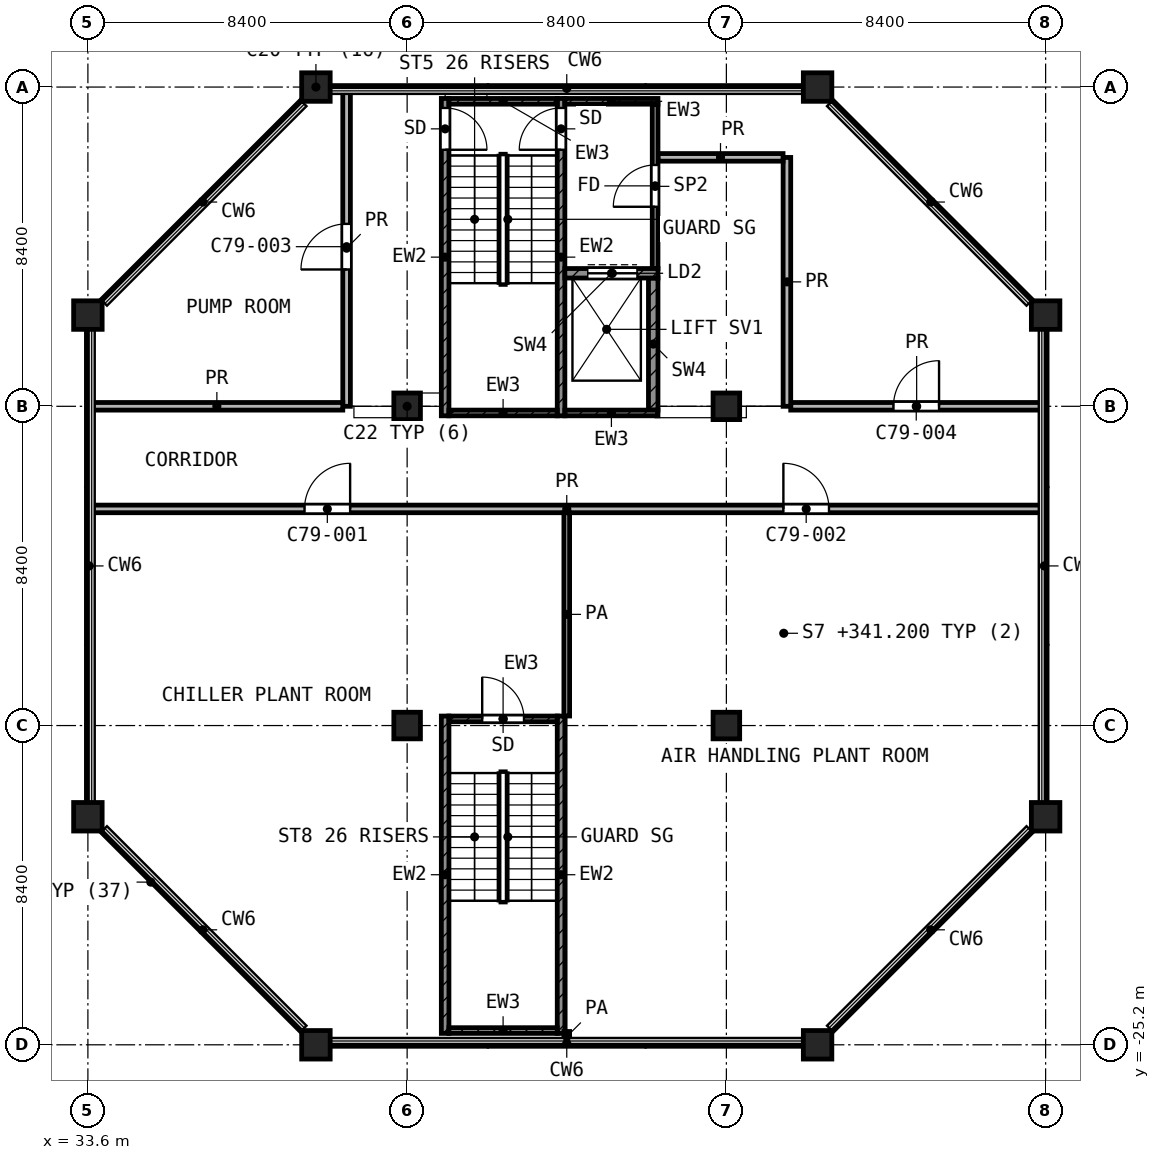
"""IFC4 building model, lengths in metres.
Left out: names, types, materials, properties, quantities, classifications, styles, units other than length and angle.
Written with IfcOpenShell. Run it as: python <this file> out.ifc"""

import sys

from ifc_helpers import new_model, si_unit, direction, frame, frame_2d, origin, origin_2d, place, context, subcontext, project, spatial, rectangle, extrude, element, fill, save


model = new_model("IFC4")
c1 = context("Model", 3, precision=1e-05, world=origin(), true_north=direction((0.0, 1.0)))
c2 = subcontext(c1, "Body", "Model", "MODEL_VIEW")
j1 = project(units=[si_unit("LENGTHUNIT", "METRE"), si_unit("PLANEANGLEUNIT", "RADIAN")], contexts=[c1])
p1 = place(None, origin())
s1 = spatial("IfcSite", under=j1, at=p1, CompositionType="ELEMENT")
p2 = place(p1, origin())
s2 = spatial("IfcBuilding", under=s1, at=p2, CompositionType="ELEMENT")
p3 = place(p2, frame((0.0, 0.0, 341.2)))
s3 = spatial("IfcBuildingStorey", under=s2, at=p3, CompositionType="ELEMENT", Elevation=341.2)
for number, where, z_axis, x_axis in (
    (1, (39.6, 0.0, 0.0), (0.0, 0.0, 1.0), (1.0, 0.0, 0.0)),
    (2, (52.8, 0.0, 0.0), (0.0, 0.0, 1.0), (1.0, 0.0, 0.0)),
    (3, (33.6, -6.0, 0.0), (0.0, 0.0, 1.0), (1.0, 0.0, 0.0)),
    (4, (58.8, -6.0, 0.0), (0.0, 0.0, 1.0), (1.0, 0.0, 0.0)),
):
    element("IfcColumn", number, at=place(p3, frame(where, z_axis=z_axis, x_axis=x_axis)), inside=s3, PredefinedType="COLUMN", context=c2, shape_type="SweptSolid", body=[
        extrude(rectangle(XDim=0.75, YDim=0.75, at=origin_2d()), origin(), (0.0, 0.0, 1.0), 4.5),
    ])
for number, where, z_axis, x_axis in (
    (5, (42.0, -8.4, 0.0), (0.0, 0.0, 1.0), (1.0, 0.0, 0.0)),
    (6, (50.4, -8.4, 0.0), (0.0, 0.0, 1.0), (1.0, 0.0, 0.0)),
    (7, (42.0, -16.8, 0.0), (0.0, 0.0, 1.0), (1.0, 0.0, 0.0)),
    (8, (50.4, -16.8, 0.0), (0.0, 0.0, 1.0), (1.0, 0.0, 0.0)),
):
    element("IfcColumn", number, at=place(p3, frame(where, z_axis=z_axis, x_axis=x_axis)), inside=s3, PredefinedType="COLUMN", context=c2, shape_type="SweptSolid", body=[
        extrude(rectangle(XDim=0.7, YDim=0.7, at=origin_2d()), origin(), (0.0, 0.0, 1.0), 4.5),
    ])
for number, where, z_axis, x_axis in (
    (9, (33.6, -19.2, 0.0), (0.0, 0.0, 1.0), (1.0, 0.0, 0.0)),
    (10, (58.8, -19.2, 0.0), (0.0, 0.0, 1.0), (1.0, 0.0, 0.0)),
    (11, (39.6, -25.2, 0.0), (0.0, 0.0, 1.0), (1.0, 0.0, 0.0)),
    (12, (52.8, -25.2, 0.0), (0.0, 0.0, 1.0), (1.0, 0.0, 0.0)),
):
    element("IfcColumn", number, at=place(p3, frame(where, z_axis=z_axis, x_axis=x_axis)), inside=s3, PredefinedType="COLUMN", context=c2, shape_type="SweptSolid", body=[
        extrude(rectangle(XDim=0.75, YDim=0.75, at=origin_2d()), origin(), (0.0, 0.0, 1.0), 4.5),
    ])
p4 = place(p3, frame((43.0, -8.65, 0.0), z_axis=(0.0, 0.0, 1.0), x_axis=(0.0, 1.0, 0.0)))
e13 = element("IfcWall", 13, at=p4, inside=s3, PredefinedType="SHEAR", context=c2, shape_type="SweptSolid", body=[
    extrude(rectangle(XDim=8.35, YDim=0.2, at=frame_2d((4.175, 0.0))), origin(), (0.0, 0.0, 1.0), 4.2),
])
p5 = place(p4, frame((7.0, 0.0, 0.0)))
e14 = element("IfcOpeningElement", 14, at=p5, cuts=e13, PredefinedType="OPENING", context=c2, shape_type="SweptSolid", body=[
    extrude(rectangle(XDim=1.1, YDim=2.1, at=frame_2d((0.55, 1.05))), frame((0.0, 0.11, 0.0), z_axis=(0.0, -1.0, 0.0), x_axis=(1.0, 0.0, 0.0)), (0.0, 0.0, 1.0), 0.22),
])
p6 = place(p3, frame((46.05, -8.65, 0.0), z_axis=(0.0, 0.0, 1.0), x_axis=(0.0, 1.0, 0.0)))
e15 = element("IfcWall", 15, at=p6, inside=s3, PredefinedType="SHEAR", context=c2, shape_type="SweptSolid", body=[
    extrude(rectangle(XDim=8.35, YDim=0.2, at=frame_2d((4.175, 0.0))), origin(), (0.0, 0.0, 1.0), 4.2),
])
p7 = place(p6, frame((7.0, 0.0, 0.0)))
e16 = element("IfcOpeningElement", 16, at=p7, cuts=e15, PredefinedType="OPENING", context=c2, shape_type="SweptSolid", body=[
    extrude(rectangle(XDim=1.1, YDim=2.1, at=frame_2d((0.55, 1.05))), frame((0.0, 0.11, 0.0), z_axis=(0.0, -1.0, 0.0), x_axis=(1.0, 0.0, 0.0)), (0.0, 0.0, 1.0), 0.22),
])
p8 = place(p3, frame((43.1, -0.375, 0.0), z_axis=(0.0, 0.0, 1.0), x_axis=(1.0, 0.0, 0.0)))
e17 = element("IfcWall", 17, at=p8, inside=s3, PredefinedType="SHEAR", context=c2, shape_type="SweptSolid", body=[
    extrude(rectangle(XDim=2.85, YDim=0.15, at=frame_2d((1.425, 0.0))), origin(), (0.0, 0.0, 1.0), 4.2),
])
p9 = place(p3, frame((46.15, -0.375, 0.0), z_axis=(0.0, 0.0, 1.0), x_axis=(1.0, 0.0, 0.0)))
e18 = element("IfcWall", 18, at=p9, inside=s3, PredefinedType="SHEAR", context=c2, shape_type="SweptSolid", body=[
    extrude(rectangle(XDim=2.45, YDim=0.15, at=frame_2d((1.225, 0.0))), origin(), (0.0, 0.0, 1.0), 4.2),
])
p10 = place(p3, frame((43.1, -8.575, 0.0), z_axis=(0.0, 0.0, 1.0), x_axis=(1.0, 0.0, 0.0)))
e19 = element("IfcWall", 19, at=p10, inside=s3, PredefinedType="SHEAR", context=c2, shape_type="SweptSolid", body=[
    extrude(rectangle(XDim=2.85, YDim=0.15, at=frame_2d((1.425, 0.0))), origin(), (0.0, 0.0, 1.0), 4.2),
])
p11 = place(p3, frame((46.15, -8.575, 0.0), z_axis=(0.0, 0.0, 1.0), x_axis=(1.0, 0.0, 0.0)))
e20 = element("IfcWall", 20, at=p11, inside=s3, PredefinedType="SHEAR", context=c2, shape_type="SweptSolid", body=[
    extrude(rectangle(XDim=2.45, YDim=0.15, at=frame_2d((1.225, 0.0))), origin(), (0.0, 0.0, 1.0), 4.2),
])
p12 = place(p3, frame((46.15, -4.9, 0.0), z_axis=(0.0, 0.0, 1.0), x_axis=(1.0, 0.0, 0.0)))
e21 = element("IfcWall", 21, at=p12, inside=s3, PredefinedType="SHEAR", context=c2, shape_type="SweptSolid", body=[
    extrude(rectangle(XDim=2.45, YDim=0.25, at=frame_2d((1.225, 0.0))), origin(), (0.0, 0.0, 1.0), 4.2),
])
p13 = place(p12, frame((0.6, 0.0, 0.0)))
e22 = element("IfcOpeningElement", 22, at=p13, cuts=e21, PredefinedType="OPENING", context=c2, shape_type="SweptSolid", body=[
    extrude(rectangle(XDim=1.3, YDim=2.1, at=frame_2d((0.65, 1.05))), frame((0.0, 0.135, 0.0), z_axis=(0.0, -1.0, 0.0), x_axis=(1.0, 0.0, 0.0)), (0.0, 0.0, 1.0), 0.27),
])
p14 = place(p3, frame((48.475, -8.5, 0.0), z_axis=(0.0, 0.0, 1.0), x_axis=(0.0, 1.0, 0.0)))
e23 = element("IfcWall", 23, at=p14, inside=s3, PredefinedType="SHEAR", context=c2, shape_type="SweptSolid", body=[
    extrude(rectangle(XDim=3.475, YDim=0.25, at=frame_2d((1.738, 0.0))), origin(), (0.0, 0.0, 1.0), 4.2),
])
p15 = place(p3, frame((48.525, -4.775, 0.0), z_axis=(0.0, 0.0, 1.0), x_axis=(0.0, 1.0, 0.0)))
e24 = element("IfcWall", 24, at=p15, inside=s3, PredefinedType="PARTITIONING", context=c2, shape_type="SweptSolid", body=[
    extrude(rectangle(XDim=4.325, YDim=0.15, at=frame_2d((2.163, 0.0))), origin(), (0.0, 0.0, 1.0), 4.2),
])
p16 = place(p15, frame((1.625, 0.0, 0.0)))
e25 = element("IfcOpeningElement", 25, at=p16, cuts=e24, PredefinedType="OPENING", context=c2, shape_type="SweptSolid", body=[
    extrude(rectangle(XDim=1.1, YDim=2.1, at=frame_2d((0.55, 1.05))), frame((0.0, 0.085, 0.0), z_axis=(0.0, -1.0, 0.0), x_axis=(1.0, 0.0, 0.0)), (0.0, 0.0, 1.0), 0.17),
])
for number, where, z_axis, x_axis in (
    (26, (43.0, -24.9, 0.0), (0.0, 0.0, 1.0), (0.0, 1.0, 0.0)),
    (27, (46.05, -24.9, 0.0), (0.0, 0.0, 1.0), (0.0, 1.0, 0.0)),
):
    element("IfcWall", number, at=place(p3, frame(where, z_axis=z_axis, x_axis=x_axis)), inside=s3, PredefinedType="SHEAR", context=c2, shape_type="SweptSolid", body=[
        extrude(rectangle(XDim=8.35, YDim=0.2, at=frame_2d((4.175, 0.0))), origin(), (0.0, 0.0, 1.0), 4.2),
    ])
p17 = place(p3, frame((43.1, -16.625, 0.0), z_axis=(0.0, 0.0, 1.0), x_axis=(1.0, 0.0, 0.0)))
e28 = element("IfcWall", 28, at=p17, inside=s3, PredefinedType="SHEAR", context=c2, shape_type="SweptSolid", body=[
    extrude(rectangle(XDim=2.85, YDim=0.15, at=frame_2d((1.425, 0.0))), origin(), (0.0, 0.0, 1.0), 4.2),
])
p18 = place(p17, frame((0.875, 0.0, 0.0)))
e29 = element("IfcOpeningElement", 29, at=p18, cuts=e28, PredefinedType="OPENING", context=c2, shape_type="SweptSolid", body=[
    extrude(rectangle(XDim=1.1, YDim=2.1, at=frame_2d((0.55, 1.05))), frame((0.0, 0.085, 0.0), z_axis=(0.0, -1.0, 0.0), x_axis=(1.0, 0.0, 0.0)), (0.0, 0.0, 1.0), 0.17),
])
p19 = place(p3, frame((43.1, -24.825, 0.0), z_axis=(0.0, 0.0, 1.0), x_axis=(1.0, 0.0, 0.0)))
e30 = element("IfcWall", 30, at=p19, inside=s3, PredefinedType="SHEAR", context=c2, shape_type="SweptSolid", body=[
    extrude(rectangle(XDim=2.85, YDim=0.15, at=frame_2d((1.425, 0.0))), origin(), (0.0, 0.0, 1.0), 4.2),
])
p20 = place(p3, frame((46.2, -25.12, 0.0), z_axis=(0.0, 0.0, 1.0), x_axis=(0.0, 1.0, 0.0)))
e31 = element("IfcWall", 31, at=p20, inside=s3, PredefinedType="PARTITIONING", context=c2, shape_type="SweptSolid", body=[
    extrude(rectangle(XDim=0.27, YDim=0.15, at=frame_2d((0.135, 0.0))), origin(), (0.0, 0.0, 1.0), 4.2),
])
p21 = place(p3, frame((46.2, -16.549, 0.0), z_axis=(0.0, 0.0, 1.0), x_axis=(0.0, 1.0, 0.0)))
e32 = element("IfcWall", 32, at=p21, inside=s3, PredefinedType="PARTITIONING", context=c2, shape_type="SweptSolid", body=[
    extrude(rectangle(XDim=5.349, YDim=0.15, at=frame_2d((2.675, 0.0))), origin(), (0.0, 0.0, 1.0), 4.2),
])
p22 = place(p3, frame((33.68, -11.1, 0.0), z_axis=(0.0, 0.0, 1.0), x_axis=(1.0, 0.0, 0.0)))
e33 = element("IfcWall", 33, at=p22, inside=s3, PredefinedType="PARTITIONING", context=c2, shape_type="SweptSolid", body=[
    extrude(rectangle(XDim=25.04, YDim=0.2, at=frame_2d((12.52, 0.0))), origin(), (0.0, 0.0, 1.0), 4.2),
])
p23 = place(p22, frame((5.62, 0.0, 0.0)))
e34 = element("IfcOpeningElement", 34, at=p23, cuts=e33, PredefinedType="OPENING", context=c2, shape_type="SweptSolid", body=[
    extrude(rectangle(XDim=1.2, YDim=2.1, at=frame_2d((0.6, 1.05))), frame((0.0, 0.11, 0.0), z_axis=(0.0, -1.0, 0.0), x_axis=(1.0, 0.0, 0.0)), (0.0, 0.0, 1.0), 0.22),
])
p24 = place(p22, frame((18.22, 0.0, 0.0)))
e35 = element("IfcOpeningElement", 35, at=p24, cuts=e33, PredefinedType="OPENING", context=c2, shape_type="SweptSolid", body=[
    extrude(rectangle(XDim=1.2, YDim=2.1, at=frame_2d((0.6, 1.05))), frame((0.0, 0.11, 0.0), z_axis=(0.0, -1.0, 0.0), x_axis=(1.0, 0.0, 0.0)), (0.0, 0.0, 1.0), 0.22),
])
p25 = place(p3, frame((33.68, -8.4, 0.0), z_axis=(0.0, 0.0, 1.0), x_axis=(1.0, 0.0, 0.0)))
e36 = element("IfcWall", 36, at=p25, inside=s3, PredefinedType="PARTITIONING", context=c2, shape_type="SweptSolid", body=[
    extrude(rectangle(XDim=6.627, YDim=0.2, at=frame_2d((3.313, 0.0))), origin(), (0.0, 0.0, 1.0), 4.2),
])
p26 = place(p3, frame((52.093, -8.4, 0.0), z_axis=(0.0, 0.0, 1.0), x_axis=(1.0, 0.0, 0.0)))
e37 = element("IfcWall", 37, at=p26, inside=s3, PredefinedType="PARTITIONING", context=c2, shape_type="SweptSolid", body=[
    extrude(rectangle(XDim=6.627, YDim=0.2, at=frame_2d((3.313, 0.0))), origin(), (0.0, 0.0, 1.0), 4.2),
])
p27 = place(p26, frame((2.703, 0.0, 0.0)))
e38 = element("IfcOpeningElement", 38, at=p27, cuts=e37, PredefinedType="OPENING", context=c2, shape_type="SweptSolid", body=[
    extrude(rectangle(XDim=1.2, YDim=2.1, at=frame_2d((0.6, 1.05))), frame((0.0, 0.11, 0.0), z_axis=(0.0, -1.0, 0.0), x_axis=(1.0, 0.0, 0.0)), (0.0, 0.0, 1.0), 0.22),
])
p28 = place(p3, frame((48.6, -1.85, 0.0), z_axis=(0.0, 0.0, 1.0), x_axis=(1.0, 0.0, 0.0)))
e39 = element("IfcWall", 39, at=p28, inside=s3, PredefinedType="PARTITIONING", context=c2, shape_type="SweptSolid", body=[
    extrude(rectangle(XDim=3.291, YDim=0.2, at=frame_2d((1.646, 0.0))), origin(), (0.0, 0.0, 1.0), 4.2),
])
p29 = place(p3, frame((40.407, -8.4, 0.0), z_axis=(0.0, 0.0, 1.0), x_axis=(0.0, 1.0, 0.0)))
e40 = element("IfcWall", 40, at=p29, inside=s3, PredefinedType="PARTITIONING", context=c2, shape_type="SweptSolid", body=[
    extrude(rectangle(XDim=8.32, YDim=0.2, at=frame_2d((4.16, 0.0))), origin(), (0.0, 0.0, 1.0), 4.2),
])
p30 = place(p29, frame((3.6, 0.0, 0.0)))
e41 = element("IfcOpeningElement", 41, at=p30, cuts=e40, PredefinedType="OPENING", context=c2, shape_type="SweptSolid", body=[
    extrude(rectangle(XDim=1.2, YDim=2.1, at=frame_2d((0.6, 1.05))), frame((0.0, 0.11, 0.0), z_axis=(0.0, -1.0, 0.0), x_axis=(1.0, 0.0, 0.0)), (0.0, 0.0, 1.0), 0.22),
])
p31 = place(p3, frame((51.993, -8.4, 0.0), z_axis=(0.0, 0.0, 1.0), x_axis=(0.0, 1.0, 0.0)))
e42 = element("IfcWall", 42, at=p31, inside=s3, PredefinedType="PARTITIONING", context=c2, shape_type="SweptSolid", body=[
    extrude(rectangle(XDim=6.548, YDim=0.2, at=frame_2d((3.274, 0.0))), origin(), (0.0, 0.0, 1.0), 4.2),
])
p32 = place(p5, frame((1.1, 0.0, 0.0), z_axis=(0.0, 0.0, 1.0), x_axis=(-1.0, 0.0, 0.0)))
e43 = element("IfcDoor", 43, at=p32, inside=s3, OperationType="SINGLE_SWING_LEFT", PredefinedType="DOOR", context=c2, shape_type="SweptSolid", body=[
    extrude(rectangle(XDim=1.1, YDim=2.1, at=frame_2d((0.55, 1.05))), frame((0.0, 0.025, 0.0), z_axis=(0.0, -1.0, 0.0), x_axis=(1.0, 0.0, 0.0)), (0.0, 0.0, 1.0), 0.05),
])
fill(e14, e43)
p33 = place(p7, origin())
e44 = element("IfcDoor", 44, at=p33, inside=s3, OperationType="SINGLE_SWING_LEFT", PredefinedType="DOOR", context=c2, shape_type="SweptSolid", body=[
    extrude(rectangle(XDim=1.1, YDim=2.1, at=frame_2d((0.55, 1.05))), frame((0.0, 0.025, 0.0), z_axis=(0.0, -1.0, 0.0), x_axis=(1.0, 0.0, 0.0)), (0.0, 0.0, 1.0), 0.05),
])
fill(e16, e44)
p34 = place(p13, origin())
e45 = element("IfcDoor", 45, at=p34, inside=s3, OperationType="DOUBLE_DOOR_SLIDING", PredefinedType="DOOR", context=c2, shape_type="SweptSolid", body=[
    extrude(rectangle(XDim=1.3, YDim=2.1, at=frame_2d((0.65, 1.05))), frame((0.0, 0.025, 0.0), z_axis=(0.0, -1.0, 0.0), x_axis=(1.0, 0.0, 0.0)), (0.0, 0.0, 1.0), 0.05),
])
fill(e22, e45)
p35 = place(p16, origin())
e46 = element("IfcDoor", 46, at=p35, inside=s3, OperationType="SINGLE_SWING_LEFT", PredefinedType="DOOR", context=c2, shape_type="SweptSolid", body=[
    extrude(rectangle(XDim=1.1, YDim=2.1, at=frame_2d((0.55, 1.05))), frame((0.0, 0.025, 0.0), z_axis=(0.0, -1.0, 0.0), x_axis=(1.0, 0.0, 0.0)), (0.0, 0.0, 1.0), 0.05),
])
fill(e25, e46)
p36 = place(p18, origin())
e47 = element("IfcDoor", 47, at=p36, inside=s3, OperationType="SINGLE_SWING_LEFT", PredefinedType="DOOR", context=c2, shape_type="SweptSolid", body=[
    extrude(rectangle(XDim=1.1, YDim=2.1, at=frame_2d((0.55, 1.05))), frame((0.0, 0.025, 0.0), z_axis=(0.0, -1.0, 0.0), x_axis=(1.0, 0.0, 0.0)), (0.0, 0.0, 1.0), 0.05),
])
fill(e29, e47)
p37 = place(p23, origin())
e48 = element("IfcDoor", 48, at=p37, inside=s3, OperationType="SINGLE_SWING_RIGHT", PredefinedType="DOOR", context=c2, shape_type="SweptSolid", body=[
    extrude(rectangle(XDim=1.2, YDim=2.1, at=frame_2d((0.6, 1.05))), frame((0.0, 0.025, 0.0), z_axis=(0.0, -1.0, 0.0), x_axis=(1.0, 0.0, 0.0)), (0.0, 0.0, 1.0), 0.05),
])
fill(e34, e48)
p38 = place(p24, origin())
e49 = element("IfcDoor", 49, at=p38, inside=s3, OperationType="SINGLE_SWING_LEFT", PredefinedType="DOOR", context=c2, shape_type="SweptSolid", body=[
    extrude(rectangle(XDim=1.2, YDim=2.1, at=frame_2d((0.6, 1.05))), frame((0.0, 0.025, 0.0), z_axis=(0.0, -1.0, 0.0), x_axis=(1.0, 0.0, 0.0)), (0.0, 0.0, 1.0), 0.05),
])
fill(e35, e49)
p39 = place(p30, origin())
e50 = element("IfcDoor", 50, at=p39, inside=s3, OperationType="SINGLE_SWING_LEFT", PredefinedType="DOOR", context=c2, shape_type="SweptSolid", body=[
    extrude(rectangle(XDim=1.2, YDim=2.1, at=frame_2d((0.6, 1.05))), frame((0.0, 0.025, 0.0), z_axis=(0.0, -1.0, 0.0), x_axis=(1.0, 0.0, 0.0)), (0.0, 0.0, 1.0), 0.05),
])
fill(e41, e50)
p40 = place(p27, origin())
e51 = element("IfcDoor", 51, at=p40, inside=s3, OperationType="SINGLE_SWING_RIGHT", PredefinedType="DOOR", context=c2, shape_type="SweptSolid", body=[
    extrude(rectangle(XDim=1.2, YDim=2.1, at=frame_2d((0.6, 1.05))), frame((0.0, 0.025, 0.0), z_axis=(0.0, -1.0, 0.0), x_axis=(1.0, 0.0, 0.0)), (0.0, 0.0, 1.0), 0.05),
])
fill(e38, e51)
save(model, sys.argv[1])
